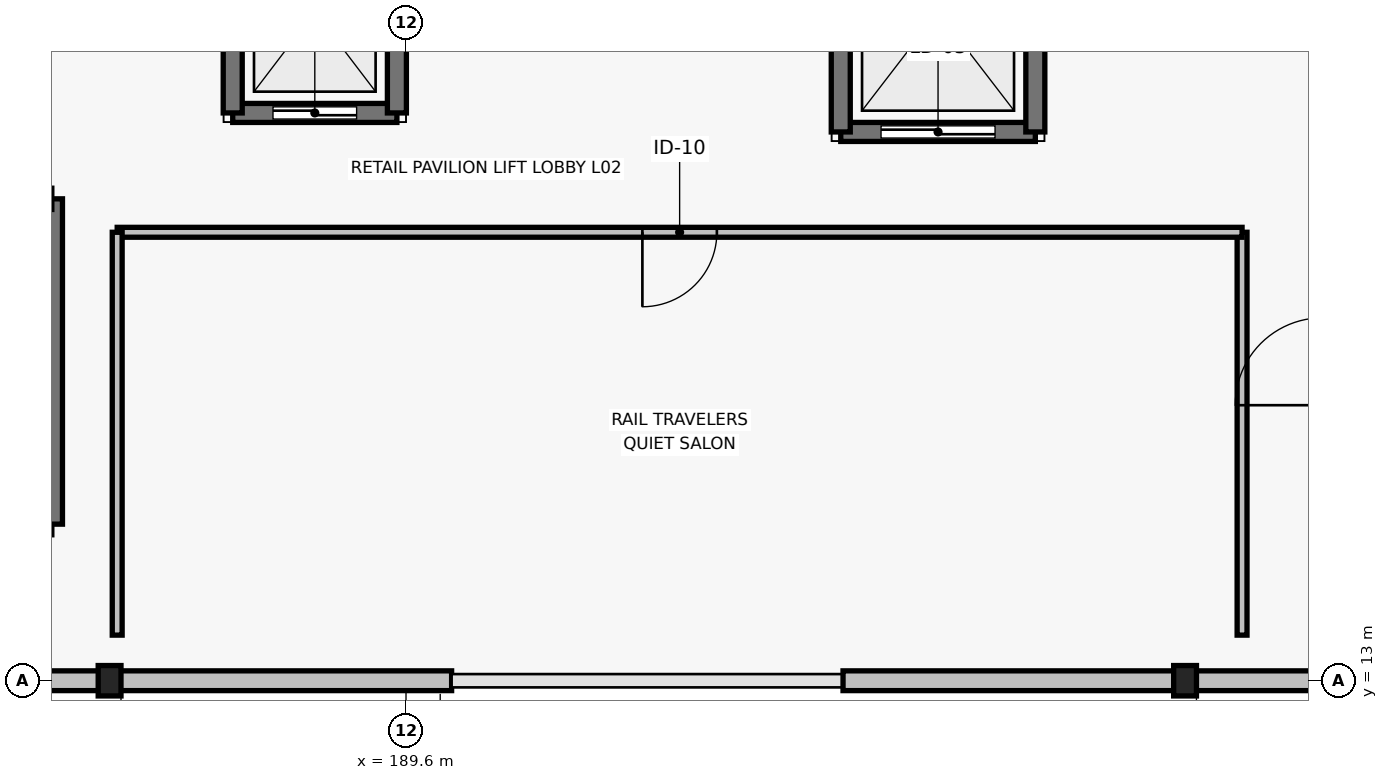
"""IFC4 building model, lengths in metres.
Left out: names, types, materials, properties, quantities, classifications, styles, units other than length and angle.
Written with IfcOpenShell. Run it as: python <this file> out.ifc"""

import sys

from ifc_helpers import new_model, si_unit, direction, frame, frame_2d, origin, origin_2d, place, context, subcontext, project, spatial, polyline, rectangle, i_section, outline, extrude, element, fill, save


model = new_model("IFC4")
c1 = context("Model", 3, precision=1e-05, world=origin(), true_north=direction((0.0, 1.0)))
c2 = subcontext(c1, "Body", "Model", "MODEL_VIEW")
j1 = project(units=[si_unit("LENGTHUNIT", "METRE"), si_unit("PLANEANGLEUNIT", "RADIAN")], contexts=[c1])
p1 = place(None, origin())
s1 = spatial("IfcSite", under=j1, at=p1, CompositionType="ELEMENT")
p2 = place(p1, origin())
s2 = spatial("IfcBuilding", under=s1, at=p2, CompositionType="ELEMENT")
p3 = place(p2, frame((0.0, 0.0, 10.8)))
s3 = spatial("IfcBuildingStorey", under=s2, at=p3, CompositionType="ELEMENT", Elevation=10.8)
for number, where, z_axis, x_axis in (
    (1, (185.7, 13.0, 0.0), (0.0, 0.0, 1.0), (1.0, 0.0, 0.0)),
    (2, (199.85, 13.0, 0.0), (0.0, 0.0, 1.0), (1.0, 0.0, 0.0)),
):
    element("IfcColumn", number, at=place(p3, frame(where, z_axis=z_axis, x_axis=x_axis)), inside=s3, PredefinedType="COLUMN", context=c2, shape_type="SweptSolid", body=[
        extrude(i_section(OverallWidth=0.3, OverallDepth=0.4, WebThickness=0.013, FlangeThickness=0.024, FilletRadius=0.027, at=origin_2d()), origin(), (0.0, 0.0, 1.0), 2.59),
    ])
for number, where, z_axis, x_axis in (
    (3, (181.2, 13.0, 0.0), (0.0, 0.0, 1.0), (1.0, 0.0, 0.0)),
    (4, (185.7, 13.0, 0.0), (0.0, 0.0, 1.0), (1.0, 0.0, 0.0)),
    (5, (195.35, 13.0, 0.0), (0.0, 0.0, 1.0), (1.0, 0.0, 0.0)),
    (6, (199.85, 13.0, 0.0), (0.0, 0.0, 1.0), (1.0, 0.0, 0.0)),
):
    element("IfcWall", number, at=place(p3, frame(where, z_axis=z_axis, x_axis=x_axis)), inside=s3, PredefinedType="STANDARD", context=c2, shape_type="SweptSolid", body=[
        extrude(rectangle(XDim=4.5, YDim=0.26, at=frame_2d((2.25, 0.0))), origin(), (0.0, 0.0, 1.0), 2.295),
    ])
p4 = place(p3, frame((184.94, 15.06, 0.0), z_axis=(0.0, 0.0, 1.0), x_axis=(0.0, 1.0, 0.0)))
e7 = element("IfcWall", 7, at=p4, inside=s3, PredefinedType="SHEAR", context=c2, shape_type="SweptSolid", body=[
    extrude(outline(polyline([(0.0, 0.0), (4.28, 0.0), (4.28, 3.739), (0.0, 2.942), (0.0, 0.0)])), frame((0.0, 0.14, 0.0), z_axis=(0.0, -1.0, 0.0), x_axis=(1.0, 0.0, 0.0)), (0.0, 0.0, 1.0), 0.28),
])
p5 = place(p3, frame((184.94, 19.34, 0.0), z_axis=(0.0, 0.0, 1.0), x_axis=(-1.0, 0.0, 0.0)))
e8 = element("IfcWall", 8, at=p5, inside=s3, PredefinedType="SHEAR", context=c2, shape_type="SweptSolid", body=[
    extrude(rectangle(XDim=10.68, YDim=0.28, at=frame_2d((5.34, 0.0))), origin(), (0.0, 0.0, 1.0), 3.739),
])
p6 = place(p3, frame((187.32, 20.47, 0.0), z_axis=(0.0, 0.0, 1.0), x_axis=(1.0, 0.0, 0.0)))
e9 = element("IfcWall", 9, at=p6, inside=s3, PredefinedType="SHEAR", context=c2, shape_type="SweptSolid", body=[
    extrude(rectangle(XDim=2.16, YDim=0.25, at=frame_2d((1.08, 0.0))), origin(), (0.0, 0.0, 1.0), 3.05),
])
p7 = place(p6, frame((0.53, 0.0, 0.0)))
e10 = element("IfcOpeningElement", 10, at=p7, cuts=e9, PredefinedType="OPENING", context=c2, shape_type="SweptSolid", body=[
    extrude(rectangle(XDim=1.1, YDim=2.2, at=frame_2d((0.55, 1.1))), frame((0.0, 0.135, 0.0), z_axis=(0.0, -1.0, 0.0), x_axis=(1.0, 0.0, 0.0)), (0.0, 0.0, 1.0), 0.27),
])
for number, where, z_axis, x_axis in (
    (11, (189.48, 20.47, 0.0), (0.0, 0.0, 1.0), (0.0, 1.0, 0.0)),
    (12, (187.32, 23.13, 0.0), (0.0, 0.0, 1.0), (0.0, -1.0, 0.0)),
):
    element("IfcWall", number, at=place(p3, frame(where, z_axis=z_axis, x_axis=x_axis)), inside=s3, PredefinedType="SHEAR", context=c2, shape_type="SweptSolid", body=[
        extrude(rectangle(XDim=2.66, YDim=0.25, at=frame_2d((1.33, 0.0))), origin(), (0.0, 0.0, 1.0), 3.05),
    ])
p8 = place(p3, frame((195.32, 20.22, 0.0), z_axis=(0.0, 0.0, 1.0), x_axis=(1.0, 0.0, 0.0)))
e13 = element("IfcWall", 13, at=p8, inside=s3, PredefinedType="SHEAR", context=c2, shape_type="SweptSolid", body=[
    extrude(rectangle(XDim=2.56, YDim=0.25, at=frame_2d((1.28, 0.0))), origin(), (0.0, 0.0, 1.0), 3.05),
])
p9 = place(p8, frame((0.53, 0.0, 0.0)))
e14 = element("IfcOpeningElement", 14, at=p9, cuts=e13, PredefinedType="OPENING", context=c2, shape_type="SweptSolid", body=[
    extrude(rectangle(XDim=1.5, YDim=2.3, at=frame_2d((0.75, 1.15))), frame((0.0, 0.135, 0.0), z_axis=(0.0, -1.0, 0.0), x_axis=(1.0, 0.0, 0.0)), (0.0, 0.0, 1.0), 0.27),
])
for number, where, z_axis, x_axis in (
    (15, (197.88, 20.22, 0.0), (0.0, 0.0, 1.0), (0.0, 1.0, 0.0)),
    (16, (195.32, 23.38, 0.0), (0.0, 0.0, 1.0), (0.0, -1.0, 0.0)),
):
    element("IfcWall", number, at=place(p3, frame(where, z_axis=z_axis, x_axis=x_axis)), inside=s3, PredefinedType="SHEAR", context=c2, shape_type="SweptSolid", body=[
        extrude(rectangle(XDim=3.16, YDim=0.25, at=frame_2d((1.58, 0.0))), origin(), (0.0, 0.0, 1.0), 3.05),
    ])
p10 = place(p3, frame((200.6, 13.6, 0.0), z_axis=(0.0, 0.0, 1.0), x_axis=(0.0, 1.0, 0.0)))
e17 = element("IfcWall", 17, at=p10, inside=s3, PredefinedType="PARTITIONING", context=c2, shape_type="SweptSolid", body=[
    extrude(outline(polyline([(0.0, 0.0), (5.3, 0.0), (5.3, 3.49), (0.0, 2.504), (0.0, 0.0)])), frame((0.0, 0.065, 0.0), z_axis=(0.0, -1.0, 0.0), x_axis=(1.0, 0.0, 0.0)), (0.0, 0.0, 1.0), 0.13),
])
p11 = place(p3, frame((200.6, 18.9, 0.0), z_axis=(0.0, 0.0, 1.0), x_axis=(-1.0, 0.0, 0.0)))
e18 = element("IfcWall", 18, at=p11, inside=s3, PredefinedType="PARTITIONING", context=c2, shape_type="SweptSolid", body=[
    extrude(rectangle(XDim=14.8, YDim=0.13, at=frame_2d((7.4, 0.0))), origin(), (0.0, 0.0, 1.0), 3.49),
])
p12 = place(p11, frame((7.89, 0.0, 0.0), z_axis=(0.0, 0.0, 1.0), x_axis=(-1.0, 0.0, 0.0)))
e19 = element("IfcOpeningElement", 19, at=p12, cuts=e18, PredefinedType="OPENING", context=c2, shape_type="SweptSolid", body=[
    extrude(rectangle(XDim=0.98, YDim=2.1, at=frame_2d((0.49, 1.05))), frame((0.0, 0.075, 0.0), z_axis=(0.0, -1.0, 0.0), x_axis=(1.0, 0.0, 0.0)), (0.0, 0.0, 1.0), 0.15),
])
p13 = place(p3, frame((185.8, 18.9, 0.0), z_axis=(0.0, 0.0, 1.0), x_axis=(0.0, -1.0, 0.0)))
e20 = element("IfcWall", 20, at=p13, inside=s3, PredefinedType="PARTITIONING", context=c2, shape_type="SweptSolid", body=[
    extrude(outline(polyline([(0.0, 0.0), (5.3, 0.0), (5.3, 2.504), (0.0, 3.49), (0.0, 0.0)])), frame((0.0, 0.065, 0.0), z_axis=(0.0, -1.0, 0.0), x_axis=(1.0, 0.0, 0.0)), (0.0, 0.0, 1.0), 0.13),
])
p14 = place(p7, origin())
e21 = element("IfcDoor", 21, at=p14, inside=s3, OperationType="SLIDING_TO_LEFT", PredefinedType="DOOR", context=c2, shape_type="SweptSolid", body=[
    extrude(rectangle(XDim=1.1, YDim=2.2, at=frame_2d((0.55, 1.1))), frame((0.0, 0.025, 0.0), z_axis=(0.0, -1.0, 0.0), x_axis=(1.0, 0.0, 0.0)), (0.0, 0.0, 1.0), 0.05),
])
fill(e10, e21)
p15 = place(p9, origin())
e22 = element("IfcDoor", 22, at=p15, inside=s3, OperationType="SLIDING_TO_LEFT", PredefinedType="DOOR", context=c2, shape_type="SweptSolid", body=[
    extrude(rectangle(XDim=1.5, YDim=2.3, at=frame_2d((0.75, 1.15))), frame((0.0, 0.025, 0.0), z_axis=(0.0, -1.0, 0.0), x_axis=(1.0, 0.0, 0.0)), (0.0, 0.0, 1.0), 0.05),
])
fill(e14, e22)
p16 = place(p12, origin())
e23 = element("IfcDoor", 23, at=p16, inside=s3, OperationType="SINGLE_SWING_RIGHT", PredefinedType="DOOR", context=c2, shape_type="SweptSolid", body=[
    extrude(rectangle(XDim=0.98, YDim=2.1, at=frame_2d((0.49, 1.05))), frame((0.0, 0.025, 0.0), z_axis=(0.0, -1.0, 0.0), x_axis=(1.0, 0.0, 0.0)), (0.0, 0.0, 1.0), 0.05),
])
fill(e19, e23)
save(model, sys.argv[1])
